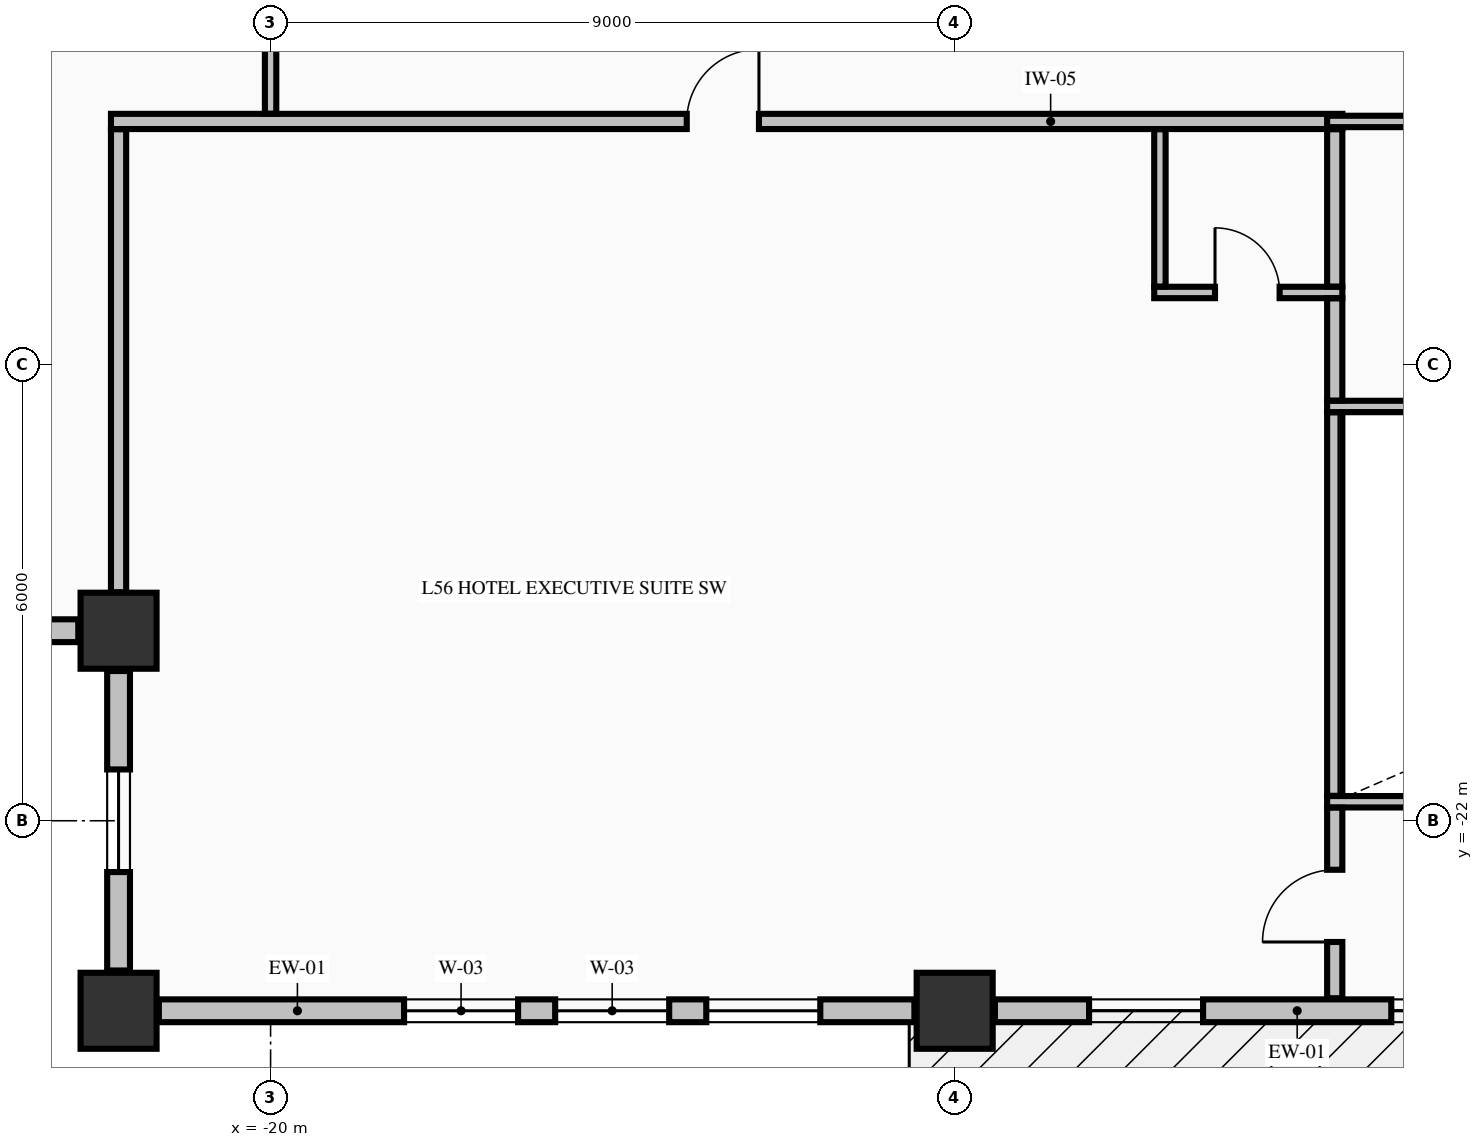
"""IFC4 building model, lengths in metres.
Left out: names, types, materials, properties, quantities, classifications, styles, units other than length and angle.
Written with IfcOpenShell. Run it as: python <this file> out.ifc"""

import sys

from ifc_helpers import new_model, si_unit, direction, frame, frame_2d, origin, origin_2d, place, context, subcontext, project, spatial, rectangle, extrude, element, fill, save


model = new_model("IFC4")
c1 = context("Model", 3, precision=1e-05, world=origin(), true_north=direction((0.0, 1.0)))
c2 = subcontext(c1, "Body", "Model", "MODEL_VIEW")
j1 = project(units=[si_unit("LENGTHUNIT", "METRE"), si_unit("PLANEANGLEUNIT", "RADIAN")], contexts=[c1])
p1 = place(None, origin())
s1 = spatial("IfcSite", under=j1, at=p1, CompositionType="ELEMENT")
p2 = place(p1, origin())
s2 = spatial("IfcBuilding", under=s1, at=p2, CompositionType="ELEMENT")
p3 = place(p2, frame((0.0, 0.0, 215.26)))
s3 = spatial("IfcBuildingStorey", under=s2, at=p3, CompositionType="ELEMENT", Elevation=215.26)
for number, where, z_axis, x_axis in (
    (1, (-22.0, -24.5, -0.25), (0.0, 0.0, 1.0), (1.0, 0.0, 0.0)),
    (2, (-11.0, -24.5, -0.25), (0.0, 0.0, 1.0), (1.0, 0.0, 0.0)),
    (3, (-22.0, -19.5, -0.25), (0.0, 0.0, 1.0), (1.0, 0.0, 0.0)),
):
    element("IfcColumn", number, at=place(p3, frame(where, z_axis=z_axis, x_axis=x_axis)), inside=s3, PredefinedType="COLUMN", context=c2, shape_type="SweptSolid", body=[
        extrude(rectangle(XDim=1.0, YDim=1.0, at=origin_2d()), origin(), (0.0, 0.0, 1.0), 3.4),
    ])
p4 = place(p3, frame((-26.47, -19.5, 0.0), z_axis=(0.0, 0.0, 1.0), x_axis=(1.0, 0.0, 0.0)))
e4 = element("IfcWall", 4, at=p4, inside=s3, PredefinedType="STANDARD", context=c2, shape_type="SweptSolid", body=[
    extrude(rectangle(XDim=3.94, YDim=0.3, at=frame_2d((1.97, 0.0))), origin(), (0.0, 0.0, 1.0), 2.542),
])
p5 = place(p4, frame((1.295, 0.0, 0.68)))
e5 = element("IfcOpeningElement", 5, at=p5, cuts=e4, PredefinedType="OPENING", context=c2, shape_type="SweptSolid", body=[
    extrude(rectangle(XDim=1.35, YDim=1.42, at=frame_2d((0.675, 0.71))), frame((0.0, 0.16, 0.0), z_axis=(0.0, -1.0, 0.0), x_axis=(1.0, 0.0, 0.0)), (0.0, 0.0, 1.0), 0.32),
])
p6 = place(p3, frame((-22.0, -20.03, 0.0), z_axis=(0.0, 0.0, 1.0), x_axis=(0.0, -1.0, 0.0)))
e6 = element("IfcWall", 6, at=p6, inside=s3, PredefinedType="STANDARD", context=c2, shape_type="SweptSolid", body=[
    extrude(rectangle(XDim=3.94, YDim=0.3, at=frame_2d((1.97, 0.0))), origin(), (0.0, 0.0, 1.0), 2.542),
])
p7 = place(p6, frame((1.295, 0.0, 0.68)))
e7 = element("IfcOpeningElement", 7, at=p7, cuts=e6, PredefinedType="OPENING", context=c2, shape_type="SweptSolid", body=[
    extrude(rectangle(XDim=1.35, YDim=1.42, at=frame_2d((0.675, 0.71))), frame((0.0, 0.16, 0.0), z_axis=(0.0, -1.0, 0.0), x_axis=(1.0, 0.0, 0.0)), (0.0, 0.0, 1.0), 0.32),
])
p8 = place(p3, frame((-21.47, -24.5, 0.0), z_axis=(0.0, 0.0, 1.0), x_axis=(1.0, 0.0, 0.0)))
e8 = element("IfcWall", 8, at=p8, inside=s3, PredefinedType="STANDARD", context=c2, shape_type="SweptSolid", body=[
    extrude(rectangle(XDim=9.94, YDim=0.3, at=frame_2d((4.97, 0.0))), origin(), (0.0, 0.0, 1.0), 2.542),
])
p9 = place(p8, frame((3.226, 0.0, 0.72)))
e9 = element("IfcOpeningElement", 9, at=p9, cuts=e8, PredefinedType="OPENING", context=c2, shape_type="SweptSolid", body=[
    extrude(rectangle(XDim=1.5, YDim=1.6, at=frame_2d((0.75, 0.8))), frame((0.0, 0.16, 0.0), z_axis=(0.0, -1.0, 0.0), x_axis=(1.0, 0.0, 0.0)), (0.0, 0.0, 1.0), 0.32),
])
p10 = place(p8, frame((5.214, 0.0, 0.72)))
e10 = element("IfcOpeningElement", 10, at=p10, cuts=e8, PredefinedType="OPENING", context=c2, shape_type="SweptSolid", body=[
    extrude(rectangle(XDim=1.5, YDim=1.6, at=frame_2d((0.75, 0.8))), frame((0.0, 0.16, 0.0), z_axis=(0.0, -1.0, 0.0), x_axis=(1.0, 0.0, 0.0)), (0.0, 0.0, 1.0), 0.32),
])
p11 = place(p8, frame((7.202, 0.0, 0.72)))
e11 = element("IfcOpeningElement", 11, at=p11, cuts=e8, PredefinedType="OPENING", context=c2, shape_type="SweptSolid", body=[
    extrude(rectangle(XDim=1.5, YDim=1.6, at=frame_2d((0.75, 0.8))), frame((0.0, 0.16, 0.0), z_axis=(0.0, -1.0, 0.0), x_axis=(1.0, 0.0, 0.0)), (0.0, 0.0, 1.0), 0.32),
])
p12 = place(p3, frame((-10.47, -24.5, 0.0), z_axis=(0.0, 0.0, 1.0), x_axis=(1.0, 0.0, 0.0)))
e12 = element("IfcWall", 12, at=p12, inside=s3, PredefinedType="STANDARD", context=c2, shape_type="SweptSolid", body=[
    extrude(rectangle(XDim=9.94, YDim=0.3, at=frame_2d((4.97, 0.0))), origin(), (0.0, 0.0, 1.0), 2.542),
])
p13 = place(p12, frame((8.64, 0.0, 0.0)))
e13 = element("IfcOpeningElement", 13, at=p13, cuts=e12, PredefinedType="OPENING", context=c2, shape_type="SweptSolid", body=[
    extrude(rectangle(XDim=1.1, YDim=2.15, at=frame_2d((0.55, 1.075))), frame((0.0, 0.16, 0.0), z_axis=(0.0, -1.0, 0.0), x_axis=(1.0, 0.0, 0.0)), (0.0, 0.0, 1.0), 0.32),
])
p14 = place(p12, frame((1.238, 0.0, 0.72)))
e14 = element("IfcOpeningElement", 14, at=p14, cuts=e12, PredefinedType="OPENING", context=c2, shape_type="SweptSolid", body=[
    extrude(rectangle(XDim=1.5, YDim=1.6, at=frame_2d((0.75, 0.8))), frame((0.0, 0.16, 0.0), z_axis=(0.0, -1.0, 0.0), x_axis=(1.0, 0.0, 0.0)), (0.0, 0.0, 1.0), 0.32),
])
p15 = place(p12, frame((5.214, 0.0, 0.72)))
e15 = element("IfcOpeningElement", 15, at=p15, cuts=e12, PredefinedType="OPENING", context=c2, shape_type="SweptSolid", body=[
    extrude(rectangle(XDim=1.5, YDim=1.6, at=frame_2d((0.75, 0.8))), frame((0.0, 0.16, 0.0), z_axis=(0.0, -1.0, 0.0), x_axis=(1.0, 0.0, 0.0)), (0.0, 0.0, 1.0), 0.32),
])
for number, where, z_axis, x_axis in (
    (16, (-6.1, -21.75, 0.0), (0.0, 0.0, 1.0), (1.0, 0.0, 0.0)),
    (17, (-6.1, -16.55, 0.0), (0.0, 0.0, 1.0), (1.0, 0.0, 0.0)),
):
    element("IfcWall", number, at=place(p3, frame(where, z_axis=z_axis, x_axis=x_axis)), inside=s3, PredefinedType="PARTITIONING", context=c2, shape_type="SweptSolid", body=[
        extrude(rectangle(XDim=12.2, YDim=0.15, at=frame_2d((6.1, 0.0))), origin(), (0.0, 0.0, 1.0), 3.15),
    ])
p16 = place(p3, frame((-8.375, -15.05, 0.0), z_axis=(0.0, 0.0, 1.0), x_axis=(1.0, 0.0, 0.0)))
e18 = element("IfcWall", 18, at=p16, inside=s3, PredefinedType="PARTITIONING", context=c2, shape_type="SweptSolid", body=[
    extrude(rectangle(XDim=2.475, YDim=0.15, at=frame_2d((1.238, 0.0))), origin(), (0.0, 0.0, 1.0), 3.15),
])
p17 = place(p16, frame((0.8, 0.0, 0.0)))
e19 = element("IfcOpeningElement", 19, at=p17, cuts=e18, PredefinedType="OPENING", context=c2, shape_type="SweptSolid", body=[
    extrude(rectangle(XDim=0.85, YDim=2.1, at=frame_2d((0.425, 1.05))), frame((0.0, 0.085, 0.0), z_axis=(0.0, -1.0, 0.0), x_axis=(1.0, 0.0, 0.0)), (0.0, 0.0, 1.0), 0.17),
])
p18 = place(p3, frame((-22.1, -12.8, 0.0), z_axis=(0.0, 0.0, 1.0), x_axis=(1.0, 0.0, 0.0)))
e20 = element("IfcWall", 20, at=p18, inside=s3, PredefinedType="PARTITIONING", context=c2, shape_type="SweptSolid", body=[
    extrude(rectangle(XDim=16.2, YDim=0.2, at=frame_2d((8.1, 0.0))), origin(), (0.0, 0.0, 1.0), 3.15),
])
p19 = place(p18, frame((7.575, 0.0, 0.0)))
e21 = element("IfcOpeningElement", 21, at=p19, cuts=e20, PredefinedType="OPENING", context=c2, shape_type="SweptSolid", body=[
    extrude(rectangle(XDim=0.95, YDim=2.15, at=frame_2d((0.475, 1.075))), frame((0.0, 0.11, 0.0), z_axis=(0.0, -1.0, 0.0), x_axis=(1.0, 0.0, 0.0)), (0.0, 0.0, 1.0), 0.22),
])
p20 = place(p3, frame((-6.1, -12.8, 0.0), z_axis=(0.0, 0.0, 1.0), x_axis=(1.0, 0.0, 0.0)))
e22 = element("IfcWall", 22, at=p20, inside=s3, PredefinedType="PARTITIONING", context=c2, shape_type="SweptSolid", body=[
    extrude(rectangle(XDim=12.2, YDim=0.15, at=frame_2d((6.1, 0.0))), origin(), (0.0, 0.0, 1.0), 3.15),
])
p21 = place(p20, frame((2.75, 0.0, 0.0)))
e23 = element("IfcOpeningElement", 23, at=p21, cuts=e22, PredefinedType="OPENING", context=c2, shape_type="SweptSolid", body=[
    extrude(rectangle(XDim=1.1, YDim=2.15, at=frame_2d((0.55, 1.075))), frame((0.0, 0.085, 0.0), z_axis=(0.0, -1.0, 0.0), x_axis=(1.0, 0.0, 0.0)), (0.0, 0.0, 1.0), 0.17),
])
p22 = place(p3, frame((-22.0, -18.994, 0.0), z_axis=(0.0, 0.0, 1.0), x_axis=(0.0, 1.0, 0.0)))
e24 = element("IfcWall", 24, at=p22, inside=s3, PredefinedType="PARTITIONING", context=c2, shape_type="SweptSolid", body=[
    extrude(rectangle(XDim=6.091, YDim=0.2, at=frame_2d((3.045, 0.0))), origin(), (0.0, 0.0, 1.0), 3.15),
])
p23 = place(p3, frame((-20.0, -12.697, 0.0), z_axis=(0.0, 0.0, 1.0), x_axis=(0.0, 1.0, 0.0)))
e25 = element("IfcWall", 25, at=p23, inside=s3, PredefinedType="PARTITIONING", context=c2, shape_type="SweptSolid", body=[
    extrude(rectangle(XDim=2.316, YDim=0.15, at=frame_2d((1.158, 0.0))), origin(), (0.0, 0.0, 1.0), 2.342),
])
p24 = place(p3, frame((-8.3, -14.972, 0.0), z_axis=(0.0, 0.0, 1.0), x_axis=(0.0, 1.0, 0.0)))
e26 = element("IfcWall", 26, at=p24, inside=s3, PredefinedType="PARTITIONING", context=c2, shape_type="SweptSolid", body=[
    extrude(rectangle(XDim=2.069, YDim=0.15, at=frame_2d((1.034, 0.0))), origin(), (0.0, 0.0, 1.0), 3.15),
])
p25 = place(p3, frame((-6.0, -24.335, 0.0), z_axis=(0.0, 0.0, 1.0), x_axis=(0.0, 1.0, 0.0)))
e27 = element("IfcWall", 27, at=p25, inside=s3, PredefinedType="PARTITIONING", context=c2, shape_type="SweptSolid", body=[
    extrude(rectangle(XDim=2.507, YDim=0.2, at=frame_2d((1.253, 0.0))), origin(), (0.0, 0.0, 1.0), 3.15),
])
p26 = place(p25, frame((0.74, 0.0, 0.0)))
e28 = element("IfcOpeningElement", 28, at=p26, cuts=e27, PredefinedType="OPENING", context=c2, shape_type="SweptSolid", body=[
    extrude(rectangle(XDim=0.95, YDim=2.15, at=frame_2d((0.475, 1.075))), frame((0.0, 0.11, 0.0), z_axis=(0.0, -1.0, 0.0), x_axis=(1.0, 0.0, 0.0)), (0.0, 0.0, 1.0), 0.22),
])
p27 = place(p3, frame((-6.0, -21.672, 0.0), z_axis=(0.0, 0.0, 1.0), x_axis=(0.0, 1.0, 0.0)))
e29 = element("IfcWall", 29, at=p27, inside=s3, PredefinedType="PARTITIONING", context=c2, shape_type="SweptSolid", body=[
    extrude(rectangle(XDim=5.044, YDim=0.2, at=frame_2d((2.522, 0.0))), origin(), (0.0, 0.0, 1.0), 3.15),
])
p28 = place(p3, frame((-6.0, -16.472, 0.0), z_axis=(0.0, 0.0, 1.0), x_axis=(0.0, 1.0, 0.0)))
e30 = element("IfcWall", 30, at=p28, inside=s3, PredefinedType="PARTITIONING", context=c2, shape_type="SweptSolid", body=[
    extrude(rectangle(XDim=1.344, YDim=0.2, at=frame_2d((0.672, 0.0))), origin(), (0.0, 0.0, 1.0), 3.15),
])
p29 = place(p3, frame((-6.0, -14.972, 0.0), z_axis=(0.0, 0.0, 1.0), x_axis=(0.0, 1.0, 0.0)))
e31 = element("IfcWall", 31, at=p29, inside=s3, PredefinedType="PARTITIONING", context=c2, shape_type="SweptSolid", body=[
    extrude(rectangle(XDim=2.069, YDim=0.2, at=frame_2d((1.034, 0.0))), origin(), (0.0, 0.0, 1.0), 3.15),
])
p30 = place(p7, origin())
e32 = element("IfcWindow", 32, at=p30, inside=s3, PartitioningType="SINGLE_PANEL", PredefinedType="WINDOW", context=c2, shape_type="SweptSolid", body=[
    extrude(rectangle(XDim=1.35, YDim=1.42, at=frame_2d((0.675, 0.71))), frame((0.0, 0.03, 0.0), z_axis=(0.0, -1.0, 0.0), x_axis=(1.0, 0.0, 0.0)), (0.0, 0.0, 1.0), 0.06),
])
fill(e7, e32)
p31 = place(p9, origin())
e33 = element("IfcWindow", 33, at=p31, inside=s3, PartitioningType="SINGLE_PANEL", PredefinedType="WINDOW", context=c2, shape_type="SweptSolid", body=[
    extrude(rectangle(XDim=1.5, YDim=1.6, at=frame_2d((0.75, 0.8))), frame((0.0, 0.03, 0.0), z_axis=(0.0, -1.0, 0.0), x_axis=(1.0, 0.0, 0.0)), (0.0, 0.0, 1.0), 0.06),
])
fill(e9, e33)
p32 = place(p10, origin())
e34 = element("IfcWindow", 34, at=p32, inside=s3, PartitioningType="SINGLE_PANEL", PredefinedType="WINDOW", context=c2, shape_type="SweptSolid", body=[
    extrude(rectangle(XDim=1.5, YDim=1.6, at=frame_2d((0.75, 0.8))), frame((0.0, 0.03, 0.0), z_axis=(0.0, -1.0, 0.0), x_axis=(1.0, 0.0, 0.0)), (0.0, 0.0, 1.0), 0.06),
])
fill(e10, e34)
p33 = place(p11, origin())
e35 = element("IfcWindow", 35, at=p33, inside=s3, PartitioningType="SINGLE_PANEL", PredefinedType="WINDOW", context=c2, shape_type="SweptSolid", body=[
    extrude(rectangle(XDim=1.5, YDim=1.6, at=frame_2d((0.75, 0.8))), frame((0.0, 0.03, 0.0), z_axis=(0.0, -1.0, 0.0), x_axis=(1.0, 0.0, 0.0)), (0.0, 0.0, 1.0), 0.06),
])
fill(e11, e35)
p34 = place(p14, origin())
e36 = element("IfcWindow", 36, at=p34, inside=s3, PartitioningType="SINGLE_PANEL", PredefinedType="WINDOW", context=c2, shape_type="SweptSolid", body=[
    extrude(rectangle(XDim=1.5, YDim=1.6, at=frame_2d((0.75, 0.8))), frame((0.0, 0.03, 0.0), z_axis=(0.0, -1.0, 0.0), x_axis=(1.0, 0.0, 0.0)), (0.0, 0.0, 1.0), 0.06),
])
fill(e14, e36)
p35 = place(p15, origin())
e37 = element("IfcWindow", 37, at=p35, inside=s3, PartitioningType="SINGLE_PANEL", PredefinedType="WINDOW", context=c2, shape_type="SweptSolid", body=[
    extrude(rectangle(XDim=1.5, YDim=1.6, at=frame_2d((0.75, 0.8))), frame((0.0, 0.03, 0.0), z_axis=(0.0, -1.0, 0.0), x_axis=(1.0, 0.0, 0.0)), (0.0, 0.0, 1.0), 0.06),
])
fill(e15, e37)
p36 = place(p26, origin())
e38 = element("IfcDoor", 38, at=p36, inside=s3, OperationType="SINGLE_SWING_LEFT", PredefinedType="DOOR", context=c2, shape_type="SweptSolid", body=[
    extrude(rectangle(XDim=0.95, YDim=2.15, at=frame_2d((0.475, 1.075))), frame((0.0, 0.025, 0.0), z_axis=(0.0, -1.0, 0.0), x_axis=(1.0, 0.0, 0.0)), (0.0, 0.0, 1.0), 0.05),
])
fill(e28, e38)
p37 = place(p19, origin())
e39 = element("IfcDoor", 39, at=p37, inside=s3, OperationType="SINGLE_SWING_RIGHT", PredefinedType="DOOR", context=c2, shape_type="SweptSolid", body=[
    extrude(rectangle(XDim=0.95, YDim=2.15, at=frame_2d((0.475, 1.075))), frame((0.0, 0.025, 0.0), z_axis=(0.0, -1.0, 0.0), x_axis=(1.0, 0.0, 0.0)), (0.0, 0.0, 1.0), 0.05),
])
fill(e21, e39)
p38 = place(p17, origin())
e40 = element("IfcDoor", 40, at=p38, inside=s3, OperationType="SINGLE_SWING_LEFT", PredefinedType="DOOR", context=c2, shape_type="SweptSolid", body=[
    extrude(rectangle(XDim=0.85, YDim=2.1, at=frame_2d((0.425, 1.05))), frame((0.0, 0.025, 0.0), z_axis=(0.0, -1.0, 0.0), x_axis=(1.0, 0.0, 0.0)), (0.0, 0.0, 1.0), 0.05),
])
fill(e19, e40)
save(model, sys.argv[1])
